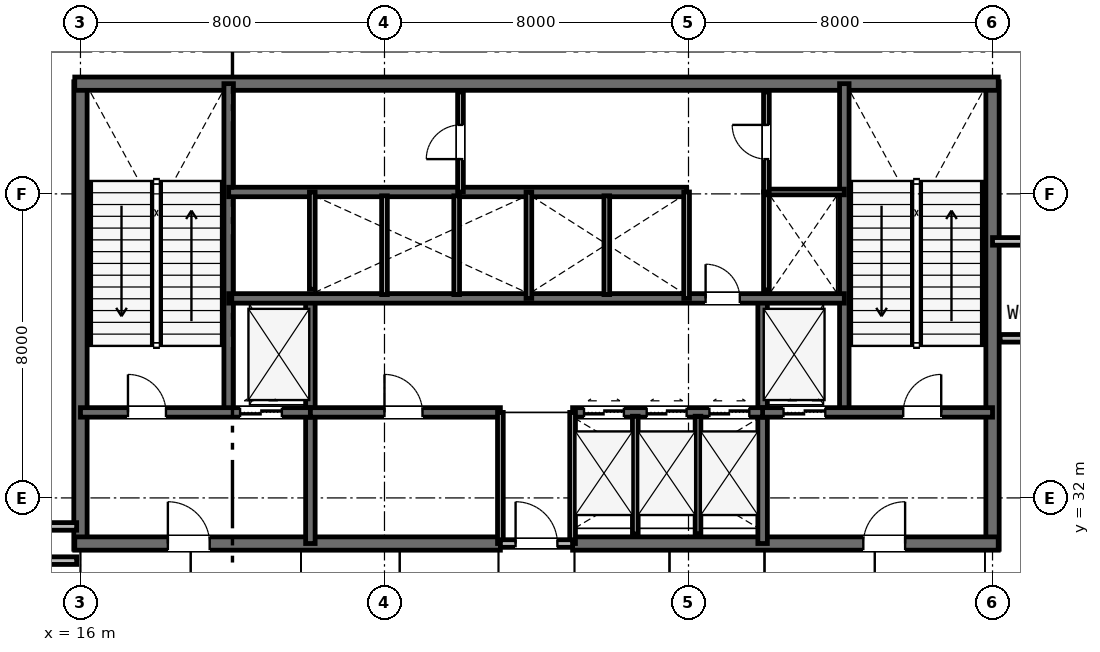
"""IFC4 building model, lengths in metres.
Left out: names, types, materials, properties, quantities, classifications, styles, units other than length and angle.
Written with IfcOpenShell. Run it as: python <this file> out.ifc"""

import sys

from ifc_helpers import new_model, si_unit, direction, frame, frame_2d, origin, place, context, subcontext, project, spatial, rectangle, extrude, element, fill, save


model = new_model("IFC4")
c1 = context("Model", 3, precision=1e-05, world=origin(), true_north=direction((0.0, 1.0)))
c2 = subcontext(c1, "Body", "Model", "MODEL_VIEW")
j1 = project(units=[si_unit("LENGTHUNIT", "METRE"), si_unit("PLANEANGLEUNIT", "RADIAN")], contexts=[c1])
p1 = place(None, origin())
s1 = spatial("IfcSite", under=j1, at=p1, CompositionType="ELEMENT")
p2 = place(p1, origin())
s2 = spatial("IfcBuilding", under=s1, at=p2, CompositionType="ELEMENT")
p3 = place(p2, frame((0.0, 0.0, 144.0)))
s3 = spatial("IfcBuildingStorey", under=s2, at=p3, CompositionType="ELEMENT", Elevation=144.0)
for number, where, z_axis, x_axis in (
    (1, (16.0, 30.65, 0.0), (0.0, 0.0, 1.0), (0.0, 1.0, 0.0)),
    (2, (40.0, 30.65, 0.0), (0.0, 0.0, 1.0), (0.0, 1.0, 0.0)),
):
    element("IfcWall", number, at=place(p3, frame(where, z_axis=z_axis, x_axis=x_axis)), inside=s3, PredefinedType="SHEAR", context=c2, shape_type="SweptSolid", body=[
        extrude(rectangle(XDim=12.3, YDim=0.35, at=frame_2d((6.15, 0.0))), origin(), (0.0, 0.0, 1.0), 4.8),
    ])
p4 = place(p3, frame((15.85, 42.9, 0.0), z_axis=(0.0, 0.0, 1.0), x_axis=(1.0, 0.0, 0.0)))
e3 = element("IfcWall", 3, at=p4, inside=s3, PredefinedType="SHEAR", context=c2, shape_type="SweptSolid", body=[
    extrude(rectangle(XDim=24.3, YDim=0.35, at=frame_2d((12.15, 0.0))), origin(), (0.0, 0.0, 1.0), 4.8),
])
p5 = place(p3, frame((15.85, 30.8, 0.0), z_axis=(0.0, 0.0, 1.0), x_axis=(1.0, 0.0, 0.0)))
e4 = element("IfcWall", 4, at=p5, inside=s3, PredefinedType="SHEAR", context=c2, shape_type="SweptSolid", body=[
    extrude(rectangle(XDim=11.2, YDim=0.35, at=frame_2d((5.6, 0.0))), origin(), (0.0, 0.0, 1.0), 4.8),
])
p6 = place(p5, frame((2.45, 0.0, 0.0)))
e5 = element("IfcOpeningElement", 5, at=p6, cuts=e4, PredefinedType="OPENING", context=c2, shape_type="SweptSolid", body=[
    extrude(rectangle(XDim=1.1, YDim=2.15, at=frame_2d((0.55, 1.075))), frame((0.0, 0.185, 0.0), z_axis=(0.0, -1.0, 0.0), x_axis=(1.0, 0.0, 0.0)), (0.0, 0.0, 1.0), 0.37),
])
p7 = place(p3, frame((28.95, 30.8, 0.0), z_axis=(0.0, 0.0, 1.0), x_axis=(1.0, 0.0, 0.0)))
e6 = element("IfcWall", 6, at=p7, inside=s3, PredefinedType="SHEAR", context=c2, shape_type="SweptSolid", body=[
    extrude(rectangle(XDim=11.2, YDim=0.35, at=frame_2d((5.6, 0.0))), origin(), (0.0, 0.0, 1.0), 4.8),
])
p8 = place(p7, frame((7.65, 0.0, 0.0)))
e7 = element("IfcOpeningElement", 7, at=p8, cuts=e6, PredefinedType="OPENING", context=c2, shape_type="SweptSolid", body=[
    extrude(rectangle(XDim=1.1, YDim=2.15, at=frame_2d((0.55, 1.075))), frame((0.0, 0.185, 0.0), z_axis=(0.0, -1.0, 0.0), x_axis=(1.0, 0.0, 0.0)), (0.0, 0.0, 1.0), 0.37),
])
for number, where, z_axis, x_axis in (
    (8, (19.9, 34.25, 0.0), (0.0, 0.0, 1.0), (0.0, 1.0, 0.0)),
    (9, (36.1, 34.25, 0.0), (0.0, 0.0, 1.0), (0.0, 1.0, 0.0)),
):
    element("IfcWall", number, at=place(p3, frame(where, z_axis=z_axis, x_axis=x_axis)), inside=s3, PredefinedType="SHEAR", context=c2, shape_type="SweptSolid", body=[
        extrude(rectangle(XDim=8.65, YDim=0.25, at=frame_2d((4.325, 0.0))), origin(), (0.0, 0.0, 1.0), 4.8),
    ])
for number, where, z_axis, x_axis in (
    (10, (22.05, 30.8, 0.0), (0.0, 0.0, 1.0), (0.0, 1.0, 0.0)),
    (11, (33.95, 30.8, 0.0), (0.0, 0.0, 1.0), (0.0, 1.0, 0.0)),
):
    element("IfcWall", number, at=place(p3, frame(where, z_axis=z_axis, x_axis=x_axis)), inside=s3, PredefinedType="SHEAR", context=c2, shape_type="SweptSolid", body=[
        extrude(rectangle(XDim=6.45, YDim=0.25, at=frame_2d((3.225, 0.0))), origin(), (0.0, 0.0, 1.0), 4.8),
    ])
p9 = place(p3, frame((16.0, 34.25, 0.0), z_axis=(0.0, 0.0, 1.0), x_axis=(1.0, 0.0, 0.0)))
e12 = element("IfcWall", 12, at=p9, inside=s3, PredefinedType="SHEAR", context=c2, shape_type="SweptSolid", body=[
    extrude(rectangle(XDim=6.05, YDim=0.25, at=frame_2d((3.025, 0.0))), origin(), (0.0, 0.0, 1.0), 4.8),
])
p10 = place(p9, frame((1.25, 0.0, 0.0)))
e13 = element("IfcOpeningElement", 13, at=p10, cuts=e12, PredefinedType="OPENING", context=c2, shape_type="SweptSolid", body=[
    extrude(rectangle(XDim=1.0, YDim=2.15, at=frame_2d((0.5, 1.075))), frame((0.0, 0.135, 0.0), z_axis=(0.0, -1.0, 0.0), x_axis=(1.0, 0.0, 0.0)), (0.0, 0.0, 1.0), 0.27),
])
p11 = place(p9, frame((4.2, 0.0, 0.0)))
e14 = element("IfcOpeningElement", 14, at=p11, cuts=e12, PredefinedType="OPENING", context=c2, shape_type="SweptSolid", body=[
    extrude(rectangle(XDim=1.1, YDim=2.15, at=frame_2d((0.55, 1.075))), frame((0.0, 0.135, 0.0), z_axis=(0.0, -1.0, 0.0), x_axis=(1.0, 0.0, 0.0)), (0.0, 0.0, 1.0), 0.27),
])
p12 = place(p3, frame((33.95, 34.25, 0.0), z_axis=(0.0, 0.0, 1.0), x_axis=(1.0, 0.0, 0.0)))
e15 = element("IfcWall", 15, at=p12, inside=s3, PredefinedType="SHEAR", context=c2, shape_type="SweptSolid", body=[
    extrude(rectangle(XDim=6.05, YDim=0.25, at=frame_2d((3.025, 0.0))), origin(), (0.0, 0.0, 1.0), 4.8),
])
p13 = place(p12, frame((3.7, 0.0, 0.0)))
e16 = element("IfcOpeningElement", 16, at=p13, cuts=e15, PredefinedType="OPENING", context=c2, shape_type="SweptSolid", body=[
    extrude(rectangle(XDim=1.0, YDim=2.15, at=frame_2d((0.5, 1.075))), frame((0.0, 0.135, 0.0), z_axis=(0.0, -1.0, 0.0), x_axis=(1.0, 0.0, 0.0)), (0.0, 0.0, 1.0), 0.27),
])
p14 = place(p12, frame((0.55, 0.0, 0.0)))
e17 = element("IfcOpeningElement", 17, at=p14, cuts=e15, PredefinedType="OPENING", context=c2, shape_type="SweptSolid", body=[
    extrude(rectangle(XDim=1.1, YDim=2.15, at=frame_2d((0.55, 1.075))), frame((0.0, 0.135, 0.0), z_axis=(0.0, -1.0, 0.0), x_axis=(1.0, 0.0, 0.0)), (0.0, 0.0, 1.0), 0.27),
])
p15 = place(p3, frame((22.05, 34.25, 0.0), z_axis=(0.0, 0.0, 1.0), x_axis=(1.0, 0.0, 0.0)))
e18 = element("IfcWall", 18, at=p15, inside=s3, PredefinedType="SHEAR", context=c2, shape_type="SweptSolid", body=[
    extrude(rectangle(XDim=5.0, YDim=0.25, at=frame_2d((2.5, 0.0))), origin(), (0.0, 0.0, 1.0), 4.8),
])
p16 = place(p15, frame((1.95, 0.0, 0.0)))
e19 = element("IfcOpeningElement", 19, at=p16, cuts=e18, PredefinedType="OPENING", context=c2, shape_type="SweptSolid", body=[
    extrude(rectangle(XDim=1.0, YDim=2.15, at=frame_2d((0.5, 1.075))), frame((0.0, 0.135, 0.0), z_axis=(0.0, -1.0, 0.0), x_axis=(1.0, 0.0, 0.0)), (0.0, 0.0, 1.0), 0.27),
])
p17 = place(p3, frame((28.95, 34.25, 0.0), z_axis=(0.0, 0.0, 1.0), x_axis=(1.0, 0.0, 0.0)))
e20 = element("IfcWall", 20, at=p17, inside=s3, PredefinedType="SHEAR", context=c2, shape_type="SweptSolid", body=[
    extrude(rectangle(XDim=5.0, YDim=0.25, at=frame_2d((2.5, 0.0))), origin(), (0.0, 0.0, 1.0), 4.8),
])
p18 = place(p17, frame((0.3, 0.0, 0.0)))
e21 = element("IfcOpeningElement", 21, at=p18, cuts=e20, PredefinedType="OPENING", context=c2, shape_type="SweptSolid", body=[
    extrude(rectangle(XDim=1.05, YDim=2.15, at=frame_2d((0.525, 1.075))), frame((0.0, 0.135, 0.0), z_axis=(0.0, -1.0, 0.0), x_axis=(1.0, 0.0, 0.0)), (0.0, 0.0, 1.0), 0.27),
])
p19 = place(p17, frame((1.95, 0.0, 0.0)))
e22 = element("IfcOpeningElement", 22, at=p19, cuts=e20, PredefinedType="OPENING", context=c2, shape_type="SweptSolid", body=[
    extrude(rectangle(XDim=1.05, YDim=2.15, at=frame_2d((0.525, 1.075))), frame((0.0, 0.135, 0.0), z_axis=(0.0, -1.0, 0.0), x_axis=(1.0, 0.0, 0.0)), (0.0, 0.0, 1.0), 0.27),
])
p20 = place(p17, frame((3.6, 0.0, 0.0)))
e23 = element("IfcOpeningElement", 23, at=p20, cuts=e20, PredefinedType="OPENING", context=c2, shape_type="SweptSolid", body=[
    extrude(rectangle(XDim=1.05, YDim=2.15, at=frame_2d((0.525, 1.075))), frame((0.0, 0.135, 0.0), z_axis=(0.0, -1.0, 0.0), x_axis=(1.0, 0.0, 0.0)), (0.0, 0.0, 1.0), 0.27),
])
p21 = place(p3, frame((19.9, 37.25, 0.0), z_axis=(0.0, 0.0, 1.0), x_axis=(1.0, 0.0, 0.0)))
e24 = element("IfcWall", 24, at=p21, inside=s3, PredefinedType="SHEAR", context=c2, shape_type="SweptSolid", body=[
    extrude(rectangle(XDim=16.2, YDim=0.25, at=frame_2d((8.1, 0.0))), origin(), (0.0, 0.0, 1.0), 4.8),
])
p22 = place(p21, frame((12.55, 0.0, 0.0)))
e25 = element("IfcOpeningElement", 25, at=p22, cuts=e24, PredefinedType="OPENING", context=c2, shape_type="SweptSolid", body=[
    extrude(rectangle(XDim=0.9, YDim=2.15, at=frame_2d((0.45, 1.075))), frame((0.0, 0.135, 0.0), z_axis=(0.0, -1.0, 0.0), x_axis=(1.0, 0.0, 0.0)), (0.0, 0.0, 1.0), 0.27),
])
p23 = place(p3, frame((19.9, 40.05, 0.0), z_axis=(0.0, 0.0, 1.0), x_axis=(1.0, 0.0, 0.0)))
e26 = element("IfcWall", 26, at=p23, inside=s3, PredefinedType="SHEAR", context=c2, shape_type="SweptSolid", body=[
    extrude(rectangle(XDim=12.05, YDim=0.25, at=frame_2d((6.025, 0.0))), origin(), (0.0, 0.0, 1.0), 4.8),
])
for number, where, z_axis, x_axis in (
    (27, (27.05, 30.8, 0.0), (0.0, 0.0, 1.0), (0.0, 1.0, 0.0)),
    (28, (28.95, 30.8, 0.0), (0.0, 0.0, 1.0), (0.0, 1.0, 0.0)),
):
    element("IfcWall", number, at=place(p3, frame(where, z_axis=z_axis, x_axis=x_axis)), inside=s3, PredefinedType="PLUMBINGWALL", context=c2, shape_type="SweptSolid", body=[
        extrude(rectangle(XDim=3.45, YDim=0.15, at=frame_2d((1.725, 0.0))), origin(), (0.0, 0.0, 1.0), 4.02),
    ])
p24 = place(p3, frame((27.05, 30.8, 0.0), z_axis=(0.0, 0.0, 1.0), x_axis=(1.0, 0.0, 0.0)))
e29 = element("IfcWall", 29, at=p24, inside=s3, PredefinedType="PARTITIONING", context=c2, shape_type="SweptSolid", body=[
    extrude(rectangle(XDim=1.9, YDim=0.2, at=frame_2d((0.95, 0.0))), origin(), (0.0, 0.0, 1.0), 4.02),
])
p25 = place(p24, frame((0.4, 0.0, 0.0)))
e30 = element("IfcOpeningElement", 30, at=p25, cuts=e29, PredefinedType="OPENING", context=c2, shape_type="SweptSolid", body=[
    extrude(rectangle(XDim=1.1, YDim=2.15, at=frame_2d((0.55, 1.075))), frame((0.0, 0.11, 0.0), z_axis=(0.0, -1.0, 0.0), x_axis=(1.0, 0.0, 0.0)), (0.0, 0.0, 1.0), 0.22),
])
for number, where, z_axis, x_axis in (
    (31, (30.6, 31.05, 0.0), (0.0, 0.0, 1.0), (0.0, 1.0, 0.0)),
    (32, (32.25, 31.05, 0.0), (0.0, 0.0, 1.0), (0.0, 1.0, 0.0)),
):
    element("IfcWall", number, at=place(p3, frame(where, z_axis=z_axis, x_axis=x_axis)), inside=s3, PredefinedType="PLUMBINGWALL", context=c2, shape_type="SweptSolid", body=[
        extrude(rectangle(XDim=3.1, YDim=0.15, at=frame_2d((1.55, 0.0))), origin(), (0.0, 0.0, 1.0), 4.02),
    ])
p26 = place(p3, frame((22.1, 37.49, 0.0), z_axis=(0.0, 0.0, 1.0), x_axis=(0.0, 1.0, 0.0)))
e33 = element("IfcWall", 33, at=p26, inside=s3, PredefinedType="PLUMBINGWALL", context=c2, shape_type="SweptSolid", body=[
    extrude(rectangle(XDim=2.56, YDim=0.15, at=frame_2d((1.28, 0.0))), origin(), (0.0, 0.0, 1.0), 4.02),
])
p27 = place(p3, frame((27.8, 37.25, 0.0), z_axis=(0.0, 0.0, 1.0), x_axis=(0.0, 1.0, 0.0)))
e34 = element("IfcWall", 34, at=p27, inside=s3, PredefinedType="PLUMBINGWALL", context=c2, shape_type="SweptSolid", body=[
    extrude(rectangle(XDim=2.8, YDim=0.15, at=frame_2d((1.4, 0.0))), origin(), (0.0, 0.0, 1.0), 4.02),
])
for number, where, z_axis, x_axis in (
    (35, (24.0, 37.35, 0.0), (0.0, 0.0, 1.0), (0.0, 1.0, 0.0)),
    (36, (25.9, 37.35, 0.0), (0.0, 0.0, 1.0), (0.0, 1.0, 0.0)),
):
    element("IfcWall", number, at=place(p3, frame(where, z_axis=z_axis, x_axis=x_axis)), inside=s3, PredefinedType="PLUMBINGWALL", context=c2, shape_type="SweptSolid", body=[
        extrude(rectangle(XDim=2.6, YDim=0.15, at=frame_2d((1.3, 0.0))), origin(), (0.0, 0.0, 1.0), 4.02),
    ])
p28 = place(p3, frame((31.95, 37.25, 0.0), z_axis=(0.0, 0.0, 1.0), x_axis=(0.0, 1.0, 0.0)))
e37 = element("IfcWall", 37, at=p28, inside=s3, PredefinedType="PLUMBINGWALL", context=c2, shape_type="SweptSolid", body=[
    extrude(rectangle(XDim=2.8, YDim=0.15, at=frame_2d((1.4, 0.0))), origin(), (0.0, 0.0, 1.0), 4.02),
])
p29 = place(p3, frame((29.85, 37.35, 0.0), z_axis=(0.0, 0.0, 1.0), x_axis=(0.0, 1.0, 0.0)))
e38 = element("IfcWall", 38, at=p29, inside=s3, PredefinedType="PLUMBINGWALL", context=c2, shape_type="SweptSolid", body=[
    extrude(rectangle(XDim=2.6, YDim=0.15, at=frame_2d((1.3, 0.0))), origin(), (0.0, 0.0, 1.0), 4.02),
])
p30 = place(p3, frame((34.05, 37.473, 0.0), z_axis=(0.0, 0.0, 1.0), x_axis=(0.0, 1.0, 0.0)))
e39 = element("IfcWall", 39, at=p30, inside=s3, PredefinedType="PLUMBINGWALL", context=c2, shape_type="SweptSolid", body=[
    extrude(rectangle(XDim=2.577, YDim=0.15, at=frame_2d((1.288, 0.0))), origin(), (0.0, 0.0, 1.0), 4.02),
])
p31 = place(p3, frame((34.05, 40.05, 0.0), z_axis=(0.0, 0.0, 1.0), x_axis=(1.0, 0.0, 0.0)))
e40 = element("IfcWall", 40, at=p31, inside=s3, PredefinedType="PARTITIONING", context=c2, shape_type="SweptSolid", body=[
    extrude(rectangle(XDim=2.05, YDim=0.15, at=frame_2d((1.025, 0.0))), origin(), (0.0, 0.0, 1.0), 4.02),
])
p32 = place(p3, frame((34.05, 40.05, 0.0), z_axis=(0.0, 0.0, 1.0), x_axis=(0.0, 1.0, 0.0)))
e41 = element("IfcWall", 41, at=p32, inside=s3, PredefinedType="PARTITIONING", context=c2, shape_type="SweptSolid", body=[
    extrude(rectangle(XDim=2.63, YDim=0.15, at=frame_2d((1.315, 0.0))), origin(), (0.0, 0.0, 1.0), 4.02),
])
p33 = place(p32, frame((0.865, 0.0, 0.0)))
e42 = element("IfcOpeningElement", 42, at=p33, cuts=e41, PredefinedType="OPENING", context=c2, shape_type="SweptSolid", body=[
    extrude(rectangle(XDim=0.9, YDim=2.15, at=frame_2d((0.45, 1.075))), frame((0.0, 0.085, 0.0), z_axis=(0.0, -1.0, 0.0), x_axis=(1.0, 0.0, 0.0)), (0.0, 0.0, 1.0), 0.17),
])
p34 = place(p3, frame((26.0, 40.05, 0.0), z_axis=(0.0, 0.0, 1.0), x_axis=(0.0, 1.0, 0.0)))
e43 = element("IfcWall", 43, at=p34, inside=s3, PredefinedType="PARTITIONING", context=c2, shape_type="SweptSolid", body=[
    extrude(rectangle(XDim=2.63, YDim=0.15, at=frame_2d((1.315, 0.0))), origin(), (0.0, 0.0, 1.0), 4.02),
])
p35 = place(p34, frame((0.865, 0.0, 0.0)))
e44 = element("IfcOpeningElement", 44, at=p35, cuts=e43, PredefinedType="OPENING", context=c2, shape_type="SweptSolid", body=[
    extrude(rectangle(XDim=0.9, YDim=2.15, at=frame_2d((0.45, 1.075))), frame((0.0, 0.085, 0.0), z_axis=(0.0, -1.0, 0.0), x_axis=(1.0, 0.0, 0.0)), (0.0, 0.0, 1.0), 0.17),
])
for number, where, z_axis, x_axis in (
    (45, (0.1, 30.35, 0.0), (0.0, 0.0, 1.0), (1.0, 0.0, 0.0)),
    (46, (0.1, 31.25, 0.0), (0.0, 0.0, 1.0), (1.0, 0.0, 0.0)),
):
    element("IfcWall", number, at=place(p3, frame(where, z_axis=z_axis, x_axis=x_axis)), inside=s3, PredefinedType="PARTITIONING", context=c2, shape_type="SweptSolid", body=[
        extrude(rectangle(XDim=15.8, YDim=0.2, at=frame_2d((7.9, 0.0))), origin(), (0.0, 0.0, 1.0), 4.02),
    ])
p36 = place(p3, frame((40.0, 38.75, 0.0), z_axis=(0.0, 0.0, 1.0), x_axis=(1.0, 0.0, 0.0)))
e47 = element("IfcWall", 47, at=p36, inside=s3, PredefinedType="PARTITIONING", context=c2, shape_type="SweptSolid", body=[
    extrude(rectangle(XDim=10.9, YDim=0.2, at=frame_2d((5.45, 0.0))), origin(), (0.0, 0.0, 1.0), 4.02),
])
p37 = place(p3, frame((40.2, 36.2, 0.0), z_axis=(0.0, 0.0, 1.0), x_axis=(1.0, 0.0, 0.0)))
e48 = element("IfcWall", 48, at=p37, inside=s3, PredefinedType="PARTITIONING", context=c2, shape_type="SweptSolid", body=[
    extrude(rectangle(XDim=2.2, YDim=0.2, at=frame_2d((1.1, 0.0))), origin(), (0.0, 0.0, 1.0), 4.02),
])
p38 = place(p25, origin())
e49 = element("IfcDoor", 49, at=p38, inside=s3, OperationType="SINGLE_SWING_LEFT", PredefinedType="DOOR", context=c2, shape_type="SweptSolid", body=[
    extrude(rectangle(XDim=1.1, YDim=2.15, at=frame_2d((0.55, 1.075))), frame((0.0, 0.025, 0.0), z_axis=(0.0, -1.0, 0.0), x_axis=(1.0, 0.0, 0.0)), (0.0, 0.0, 1.0), 0.05),
])
fill(e30, e49)
p39 = place(p10, origin())
e50 = element("IfcDoor", 50, at=p39, inside=s3, OperationType="SINGLE_SWING_LEFT", PredefinedType="DOOR", context=c2, shape_type="SweptSolid", body=[
    extrude(rectangle(XDim=1.0, YDim=2.15, at=frame_2d((0.5, 1.075))), frame((0.0, 0.025, 0.0), z_axis=(0.0, -1.0, 0.0), x_axis=(1.0, 0.0, 0.0)), (0.0, 0.0, 1.0), 0.05),
])
fill(e13, e50)
p40 = place(p13, origin())
e51 = element("IfcDoor", 51, at=p40, inside=s3, OperationType="SINGLE_SWING_RIGHT", PredefinedType="DOOR", context=c2, shape_type="SweptSolid", body=[
    extrude(rectangle(XDim=1.0, YDim=2.15, at=frame_2d((0.5, 1.075))), frame((0.0, 0.025, 0.0), z_axis=(0.0, -1.0, 0.0), x_axis=(1.0, 0.0, 0.0)), (0.0, 0.0, 1.0), 0.05),
])
fill(e16, e51)
p41 = place(p6, origin())
e52 = element("IfcDoor", 52, at=p41, inside=s3, OperationType="SINGLE_SWING_LEFT", PredefinedType="DOOR", context=c2, shape_type="SweptSolid", body=[
    extrude(rectangle(XDim=1.1, YDim=2.15, at=frame_2d((0.55, 1.075))), frame((0.0, 0.025, 0.0), z_axis=(0.0, -1.0, 0.0), x_axis=(1.0, 0.0, 0.0)), (0.0, 0.0, 1.0), 0.05),
])
fill(e5, e52)
p42 = place(p8, origin())
e53 = element("IfcDoor", 53, at=p42, inside=s3, OperationType="SINGLE_SWING_RIGHT", PredefinedType="DOOR", context=c2, shape_type="SweptSolid", body=[
    extrude(rectangle(XDim=1.1, YDim=2.15, at=frame_2d((0.55, 1.075))), frame((0.0, 0.025, 0.0), z_axis=(0.0, -1.0, 0.0), x_axis=(1.0, 0.0, 0.0)), (0.0, 0.0, 1.0), 0.05),
])
fill(e7, e53)
p43 = place(p16, origin())
e54 = element("IfcDoor", 54, at=p43, inside=s3, OperationType="SINGLE_SWING_LEFT", PredefinedType="DOOR", context=c2, shape_type="SweptSolid", body=[
    extrude(rectangle(XDim=1.0, YDim=2.15, at=frame_2d((0.5, 1.075))), frame((0.0, 0.025, 0.0), z_axis=(0.0, -1.0, 0.0), x_axis=(1.0, 0.0, 0.0)), (0.0, 0.0, 1.0), 0.05),
])
fill(e19, e54)
p44 = place(p22, origin())
e55 = element("IfcDoor", 55, at=p44, inside=s3, OperationType="SINGLE_SWING_LEFT", PredefinedType="DOOR", context=c2, shape_type="SweptSolid", body=[
    extrude(rectangle(XDim=0.9, YDim=2.15, at=frame_2d((0.45, 1.075))), frame((0.0, 0.025, 0.0), z_axis=(0.0, -1.0, 0.0), x_axis=(1.0, 0.0, 0.0)), (0.0, 0.0, 1.0), 0.05),
])
fill(e25, e55)
p45 = place(p33, origin())
e56 = element("IfcDoor", 56, at=p45, inside=s3, OperationType="SINGLE_SWING_RIGHT", PredefinedType="DOOR", context=c2, shape_type="SweptSolid", body=[
    extrude(rectangle(XDim=0.9, YDim=2.15, at=frame_2d((0.45, 1.075))), frame((0.0, 0.025, 0.0), z_axis=(0.0, -1.0, 0.0), x_axis=(1.0, 0.0, 0.0)), (0.0, 0.0, 1.0), 0.05),
])
fill(e42, e56)
p46 = place(p35, origin())
e57 = element("IfcDoor", 57, at=p46, inside=s3, OperationType="SINGLE_SWING_LEFT", PredefinedType="DOOR", context=c2, shape_type="SweptSolid", body=[
    extrude(rectangle(XDim=0.9, YDim=2.15, at=frame_2d((0.45, 1.075))), frame((0.0, 0.025, 0.0), z_axis=(0.0, -1.0, 0.0), x_axis=(1.0, 0.0, 0.0)), (0.0, 0.0, 1.0), 0.05),
])
fill(e44, e57)
p47 = place(p11, origin())
e58 = element("IfcDoor", 58, at=p47, inside=s3, OperationType="DOUBLE_DOOR_SLIDING", PredefinedType="DOOR", context=c2, shape_type="SweptSolid", body=[
    extrude(rectangle(XDim=1.1, YDim=2.15, at=frame_2d((0.55, 1.075))), frame((0.0, 0.025, 0.0), z_axis=(0.0, -1.0, 0.0), x_axis=(1.0, 0.0, 0.0)), (0.0, 0.0, 1.0), 0.05),
])
fill(e14, e58)
p48 = place(p14, origin())
e59 = element("IfcDoor", 59, at=p48, inside=s3, OperationType="DOUBLE_DOOR_SLIDING", PredefinedType="DOOR", context=c2, shape_type="SweptSolid", body=[
    extrude(rectangle(XDim=1.1, YDim=2.15, at=frame_2d((0.55, 1.075))), frame((0.0, 0.025, 0.0), z_axis=(0.0, -1.0, 0.0), x_axis=(1.0, 0.0, 0.0)), (0.0, 0.0, 1.0), 0.05),
])
fill(e17, e59)
p49 = place(p18, origin())
e60 = element("IfcDoor", 60, at=p49, inside=s3, OperationType="DOUBLE_DOOR_SLIDING", PredefinedType="DOOR", context=c2, shape_type="SweptSolid", body=[
    extrude(rectangle(XDim=1.05, YDim=2.15, at=frame_2d((0.525, 1.075))), frame((0.0, 0.025, 0.0), z_axis=(0.0, -1.0, 0.0), x_axis=(1.0, 0.0, 0.0)), (0.0, 0.0, 1.0), 0.05),
])
fill(e21, e60)
p50 = place(p19, origin())
e61 = element("IfcDoor", 61, at=p50, inside=s3, OperationType="DOUBLE_DOOR_SLIDING", PredefinedType="DOOR", context=c2, shape_type="SweptSolid", body=[
    extrude(rectangle(XDim=1.05, YDim=2.15, at=frame_2d((0.525, 1.075))), frame((0.0, 0.025, 0.0), z_axis=(0.0, -1.0, 0.0), x_axis=(1.0, 0.0, 0.0)), (0.0, 0.0, 1.0), 0.05),
])
fill(e22, e61)
p51 = place(p20, origin())
e62 = element("IfcDoor", 62, at=p51, inside=s3, OperationType="DOUBLE_DOOR_SLIDING", PredefinedType="DOOR", context=c2, shape_type="SweptSolid", body=[
    extrude(rectangle(XDim=1.05, YDim=2.15, at=frame_2d((0.525, 1.075))), frame((0.0, 0.025, 0.0), z_axis=(0.0, -1.0, 0.0), x_axis=(1.0, 0.0, 0.0)), (0.0, 0.0, 1.0), 0.05),
])
fill(e23, e62)
save(model, sys.argv[1])
